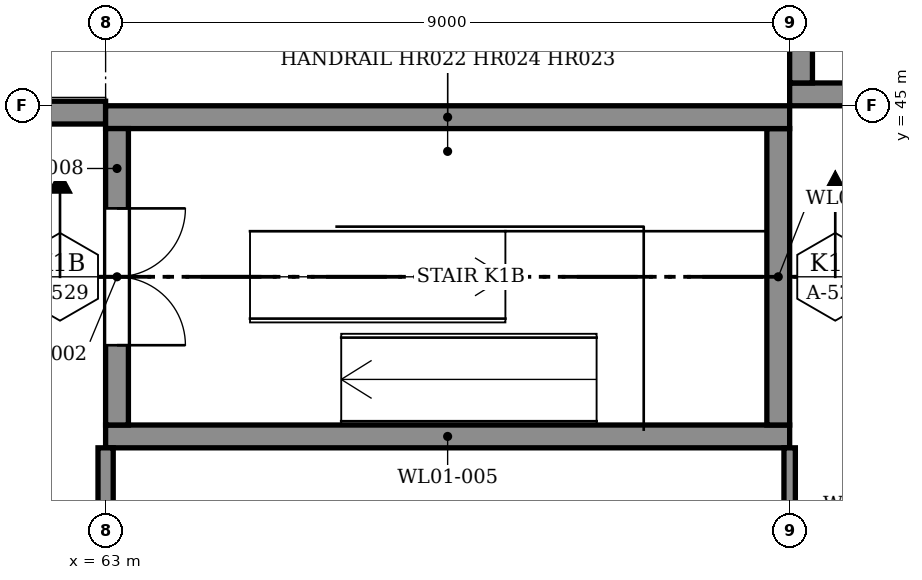
"""IFC4 building model, lengths in metres.
Left out: names, types, materials, properties, quantities, classifications, styles, units other than length and angle.
Written with IfcOpenShell. Run it as: python <this file> out.ifc"""

import sys

from ifc_helpers import new_model, si_unit, direction, frame, frame_2d, origin, place, context, subcontext, project, spatial, rectangle, extrude, element, fill, save


model = new_model("IFC4")
c1 = context("Model", 3, precision=1e-05, world=origin(), true_north=direction((0.0, 1.0)))
c2 = subcontext(c1, "Body", "Model", "MODEL_VIEW")
j1 = project(units=[si_unit("LENGTHUNIT", "METRE"), si_unit("PLANEANGLEUNIT", "RADIAN")], contexts=[c1])
p1 = place(None, origin())
s1 = spatial("IfcSite", under=j1, at=p1, CompositionType="ELEMENT")
p2 = place(p1, origin())
s2 = spatial("IfcBuilding", under=s1, at=p2, CompositionType="ELEMENT")
p3 = place(p2, frame((0.0, 0.0, 5.0)))
s3 = spatial("IfcBuildingStorey", under=s2, at=p3, CompositionType="ELEMENT", Elevation=5.0)
p4 = place(p3, frame((54.25, 44.91, 0.0), z_axis=(0.0, 0.0, 1.0), x_axis=(1.0, 0.0, 0.0)))
e1 = element("IfcWall", 1, at=p4, inside=s3, PredefinedType="SOLIDWALL", context=c2, shape_type="SweptSolid", body=[
    extrude(rectangle(XDim=8.75, YDim=0.3, at=frame_2d((4.375, 0.0))), origin(), (0.0, 0.0, 1.0), 3.578),
])
p5 = place(p3, frame((63.0, 40.65, 0.0), z_axis=(0.0, 0.0, 1.0), x_axis=(1.0, 0.0, 0.0)))
e2 = element("IfcWall", 2, at=p5, inside=s3, PredefinedType="SOLIDWALL", context=c2, shape_type="SweptSolid", body=[
    extrude(rectangle(XDim=9.0, YDim=0.3, at=frame_2d((4.5, 0.0))), origin(), (0.0, 0.0, 1.0), 4.2),
])
p6 = place(p3, frame((71.85, 40.8, 0.0), z_axis=(0.0, 0.0, 1.0), x_axis=(0.0, 1.0, 0.0)))
e3 = element("IfcWall", 3, at=p6, inside=s3, PredefinedType="SOLIDWALL", context=c2, shape_type="SweptSolid", body=[
    extrude(rectangle(XDim=3.9, YDim=0.3, at=frame_2d((1.95, 0.0))), origin(), (0.0, 0.0, 1.0), 4.2),
])
p7 = place(p3, frame((63.0, 44.85, 0.0), z_axis=(0.0, 0.0, 1.0), x_axis=(1.0, 0.0, 0.0)))
e4 = element("IfcWall", 4, at=p7, inside=s3, PredefinedType="SOLIDWALL", context=c2, shape_type="SweptSolid", body=[
    extrude(rectangle(XDim=9.0, YDim=0.3, at=frame_2d((4.5, 0.0))), origin(), (0.0, 0.0, 1.0), 4.2),
])
p8 = place(p3, frame((63.15, 40.8, 0.0), z_axis=(0.0, 0.0, 1.0), x_axis=(0.0, 1.0, 0.0)))
e5 = element("IfcWall", 5, at=p8, inside=s3, PredefinedType="SOLIDWALL", context=c2, shape_type="SweptSolid", body=[
    extrude(rectangle(XDim=3.9, YDim=0.3, at=frame_2d((1.95, 0.0))), origin(), (0.0, 0.0, 1.0), 4.2),
])
p9 = place(p8, frame((1.05, 0.0, 0.0)))
e6 = element("IfcOpeningElement", 6, at=p9, cuts=e5, PredefinedType="OPENING", context=c2, shape_type="SweptSolid", body=[
    extrude(rectangle(XDim=1.8, YDim=2.1, at=frame_2d((0.9, 1.05))), frame((0.0, 0.16, 0.0), z_axis=(0.0, -1.0, 0.0), x_axis=(1.0, 0.0, 0.0)), (0.0, 0.0, 1.0), 0.32),
])
p10 = place(p3, frame((72.0, 45.15, 0.0), z_axis=(0.0, 0.0, 1.0), x_axis=(1.0, 0.0, 0.0)))
e7 = element("IfcWall", 7, at=p10, inside=s3, PredefinedType="SOLIDWALL", context=c2, shape_type="SweptSolid", body=[
    extrude(rectangle(XDim=9.0, YDim=0.3, at=frame_2d((4.5, 0.0))), origin(), (0.0, 0.0, 1.0), 4.2),
])
p11 = place(p3, frame((72.15, 45.3, 0.0), z_axis=(0.0, 0.0, 1.0), x_axis=(0.0, 1.0, 0.0)))
e8 = element("IfcWall", 8, at=p11, inside=s3, PredefinedType="SOLIDWALL", context=c2, shape_type="SweptSolid", body=[
    extrude(rectangle(XDim=8.4, YDim=0.3, at=frame_2d((4.2, 0.0))), origin(), (0.0, 0.0, 1.0), 4.2),
])
p12 = place(p3, frame((63.0, 36.2, 0.0), z_axis=(0.0, 0.0, 1.0), x_axis=(0.0, 1.0, 0.0)))
e9 = element("IfcWall", 9, at=p12, inside=s3, PredefinedType="PARTITIONING", context=c2, shape_type="SweptSolid", body=[
    extrude(rectangle(XDim=4.3, YDim=0.2, at=frame_2d((2.15, 0.0))), origin(), (0.0, 0.0, 1.0), 3.502),
])
p13 = place(p12, frame((0.95, 0.0, 0.0)))
e10 = element("IfcOpeningElement", 10, at=p13, cuts=e9, PredefinedType="OPENING", context=c2, shape_type="SweptSolid", body=[
    extrude(rectangle(XDim=2.4, YDim=2.4, at=frame_2d((1.2, 1.2))), frame((0.0, 0.11, 0.0), z_axis=(0.0, -1.0, 0.0), x_axis=(1.0, 0.0, 0.0)), (0.0, 0.0, 1.0), 0.22),
])
p14 = place(p3, frame((72.0, 39.0, 0.0), z_axis=(0.0, 0.0, 1.0), x_axis=(0.0, 1.0, 0.0)))
e11 = element("IfcWall", 11, at=p14, inside=s3, PredefinedType="PARTITIONING", context=c2, shape_type="SweptSolid", body=[
    extrude(rectangle(XDim=1.5, YDim=0.15, at=frame_2d((0.75, 0.0))), origin(), (0.0, 0.0, 1.0), 3.158),
])
p15 = place(p9, frame((1.8, 0.0, 0.0), z_axis=(0.0, 0.0, 1.0), x_axis=(-1.0, 0.0, 0.0)))
e12 = element("IfcDoor", 12, at=p15, inside=s3, OperationType="DOUBLE_DOOR_SINGLE_SWING", PredefinedType="DOOR", context=c2, shape_type="SweptSolid", body=[
    extrude(rectangle(XDim=1.8, YDim=2.1, at=frame_2d((0.9, 1.05))), frame((0.0, 0.025, 0.0), z_axis=(0.0, -1.0, 0.0), x_axis=(1.0, 0.0, 0.0)), (0.0, 0.0, 1.0), 0.05),
])
fill(e6, e12)
save(model, sys.argv[1])
